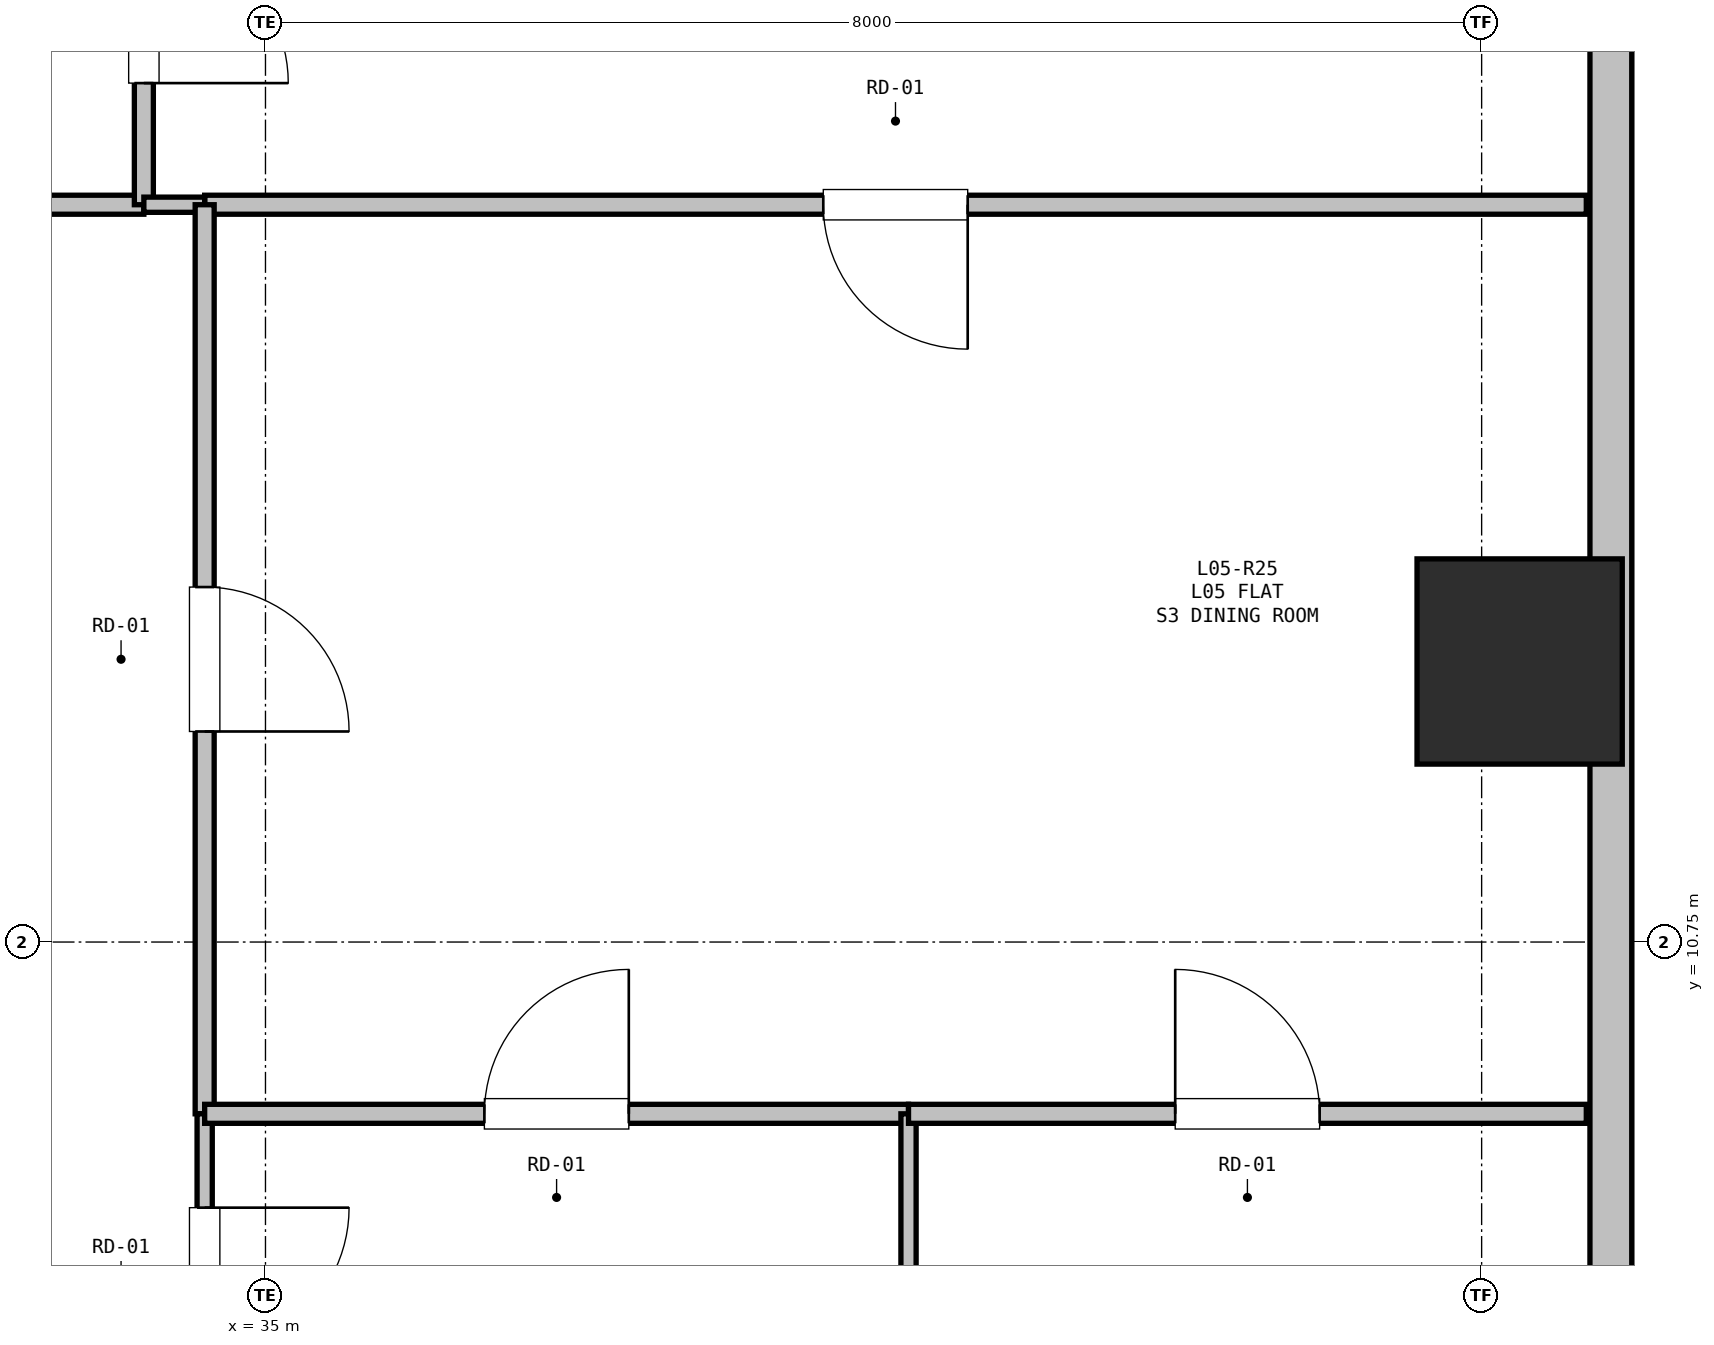
"""IFC4 building model, lengths in metres.
Left out: names, types, materials, properties, quantities, classifications, styles, units other than length and angle.
Written with IfcOpenShell. Run it as: python <this file> out.ifc"""

import sys

from ifc_helpers import new_model, si_unit, direction, frame, frame_2d, origin, origin_2d, place, context, subcontext, project, spatial, rectangle, hollow_rectangle, extrude, element, fill, save


model = new_model("IFC4")
c1 = context("Model", 3, precision=1e-05, world=origin(), true_north=direction((0.0, 1.0)))
c2 = subcontext(c1, "Body", "Model", "MODEL_VIEW")
j1 = project(units=[si_unit("LENGTHUNIT", "METRE"), si_unit("PLANEANGLEUNIT", "RADIAN")], contexts=[c1])
p1 = place(None, origin())
s1 = spatial("IfcSite", under=j1, at=p1, CompositionType="ELEMENT")
p2 = place(p1, origin())
s2 = spatial("IfcBuilding", under=s1, at=p2, CompositionType="ELEMENT")
p3 = place(p2, frame((0.0, 0.0, 22.5)))
s3 = spatial("IfcBuildingStorey", under=s2, at=p3, CompositionType="ELEMENT", Elevation=22.5)
p4 = place(p3, frame((43.25, 12.595, 0.0), z_axis=(0.0, 0.0, 1.0), x_axis=(1.0, 0.0, 0.0)))
e1 = element("IfcColumn", 1, at=p4, inside=s3, PredefinedType="COLUMN", context=c2, shape_type="SweptSolid", body=[
    extrude(hollow_rectangle(XDim=1.35, YDim=1.35, WallThickness=0.036, at=origin_2d()), origin(), (0.0, 0.0, 1.0), 3.3),
])
p5 = place(p3, frame((43.85, 19.063, 0.0), z_axis=(0.0, 0.0, 1.0), x_axis=(0.0, -1.0, 0.0)))
e2 = element("IfcWall", 2, at=p5, inside=s3, PredefinedType="SOLIDWALL", context=c2, shape_type="SweptSolid", body=[
    extrude(rectangle(XDim=12.673, YDim=0.275, at=frame_2d((6.336, 0.0))), origin(), (0.0, 0.0, 1.0), 2.66),
])
p6 = place(p3, frame((39.207, 3.71, 0.0), z_axis=(0.0, 0.0, 1.0), x_axis=(-0.86603192154, 0.499988710747, 0.0)))
e3 = element("IfcWall", 3, at=p6, inside=s3, PredefinedType="SOLIDWALL", context=c2, shape_type="SweptSolid", body=[
    extrude(rectangle(XDim=12.673, YDim=0.275, at=frame_2d((6.336, 0.0))), origin(), (0.0, 0.0, 1.0), 2.66),
])
p7 = place(p6, frame((8.136, 0.0, 0.0)))
e4 = element("IfcOpeningElement", 4, at=p7, cuts=e3, PredefinedType="OPENING", context=c2, shape_type="SweptSolid", body=[
    extrude(rectangle(XDim=1.0, YDim=2.1, at=frame_2d((0.5, 1.05))), frame((0.0, 0.147, 0.0), z_axis=(0.0, -1.0, 0.0), x_axis=(1.0, 0.0, 0.0)), (0.0, 0.0, 1.0), 0.295),
])
p8 = place(p6, frame((2.216, 0.0, 0.9)))
e5 = element("IfcOpeningElement", 5, at=p8, cuts=e3, PredefinedType="OPENING", context=c2, shape_type="SweptSolid", body=[
    extrude(rectangle(XDim=1.2, YDim=1.4, at=frame_2d((0.6, 0.7))), frame((0.0, 0.147, 0.0), z_axis=(0.0, -1.0, 0.0), x_axis=(1.0, 0.0, 0.0)), (0.0, 0.0, 1.0), 0.295),
])
p9 = place(p3, frame((34.2, 15.6, 0.0), z_axis=(0.0, 0.0, 1.0), x_axis=(-1.0, 0.0, 0.0)))
e6 = element("IfcWall", 6, at=p9, inside=s3, PredefinedType="PARTITIONING", context=c2, shape_type="SweptSolid", body=[
    extrude(rectangle(XDim=2.6, YDim=0.125, at=frame_2d((1.3, 0.0))), origin(), (0.0, 0.0, 1.0), 3.04),
])
p10 = place(p9, frame((0.825, 0.0, 0.0)))
e7 = element("IfcOpeningElement", 7, at=p10, cuts=e6, PredefinedType="OPENING", context=c2, shape_type="SweptSolid", body=[
    extrude(rectangle(XDim=0.95, YDim=2.1, at=frame_2d((0.475, 1.05))), frame((0.0, 0.073, 0.0), z_axis=(0.0, -1.0, 0.0), x_axis=(1.0, 0.0, 0.0)), (0.0, 0.0, 1.0), 0.145),
])
p11 = place(p3, frame((34.2, 18.15, 0.0), z_axis=(0.0, 0.0, 1.0), x_axis=(0.0, -1.0, 0.0)))
e8 = element("IfcWall", 8, at=p11, inside=s3, PredefinedType="PARTITIONING", context=c2, shape_type="SweptSolid", body=[
    extrude(rectangle(XDim=2.55, YDim=0.125, at=frame_2d((1.275, 0.0))), origin(), (0.0, 0.0, 1.0), 3.04),
])
p12 = place(p11, frame((0.8, 0.0, 0.0)))
e9 = element("IfcOpeningElement", 9, at=p12, cuts=e8, PredefinedType="OPENING", context=c2, shape_type="SweptSolid", body=[
    extrude(rectangle(XDim=0.95, YDim=2.1, at=frame_2d((0.475, 1.05))), frame((0.0, 0.073, 0.0), z_axis=(0.0, -1.0, 0.0), x_axis=(1.0, 0.0, 0.0)), (0.0, 0.0, 1.0), 0.145),
])
p13 = place(p3, frame((43.688, 15.6, 0.0), z_axis=(0.0, 0.0, 1.0), x_axis=(-1.0, 0.0, 0.0)))
e10 = element("IfcWall", 10, at=p13, inside=s3, PredefinedType="PARTITIONING", context=c2, shape_type="SweptSolid", body=[
    extrude(rectangle(XDim=9.088, YDim=0.125, at=frame_2d((4.544, 0.0))), origin(), (0.0, 0.0, 1.0), 2.337),
])
p14 = place(p13, frame((4.069, 0.0, 0.0)))
e11 = element("IfcOpeningElement", 11, at=p14, cuts=e10, PredefinedType="OPENING", context=c2, shape_type="SweptSolid", body=[
    extrude(rectangle(XDim=0.95, YDim=2.1, at=frame_2d((0.475, 1.05))), frame((0.0, 0.073, 0.0), z_axis=(0.0, -1.0, 0.0), x_axis=(1.0, 0.0, 0.0)), (0.0, 0.0, 1.0), 0.145),
])
p15 = place(p3, frame((34.6, 15.6, 0.0), z_axis=(0.0, 0.0, 1.0), x_axis=(-1.0, 0.0, 0.0)))
e12 = element("IfcWall", 12, at=p15, inside=s3, PredefinedType="PARTITIONING", context=c2, shape_type="SweptSolid", body=[
    extrude(rectangle(XDim=0.4, YDim=0.1, at=frame_2d((0.2, 0.0))), origin(), (0.0, 0.0, 1.0), 3.04),
])
p16 = place(p3, frame((34.6, 15.6, 0.0), z_axis=(0.0, 0.0, 1.0), x_axis=(0.0, -1.0, 0.0)))
e13 = element("IfcWall", 13, at=p16, inside=s3, PredefinedType="PARTITIONING", context=c2, shape_type="SweptSolid", body=[
    extrude(rectangle(XDim=5.98, YDim=0.125, at=frame_2d((2.99, 0.0))), origin(), (0.0, 0.0, 1.0), 3.04),
])
p17 = place(p16, frame((2.515, 0.0, 0.0)))
e14 = element("IfcOpeningElement", 14, at=p17, cuts=e13, PredefinedType="OPENING", context=c2, shape_type="SweptSolid", body=[
    extrude(rectangle(XDim=0.95, YDim=2.1, at=frame_2d((0.475, 1.05))), frame((0.0, 0.073, 0.0), z_axis=(0.0, -1.0, 0.0), x_axis=(1.0, 0.0, 0.0)), (0.0, 0.0, 1.0), 0.145),
])
p18 = place(p3, frame((34.6, 9.62, 0.0), z_axis=(0.0, 0.0, 1.0), x_axis=(0.0, -1.0, 0.0)))
e15 = element("IfcWall", 15, at=p18, inside=s3, PredefinedType="PARTITIONING", context=c2, shape_type="SweptSolid", body=[
    extrude(rectangle(XDim=3.064, YDim=0.1, at=frame_2d((1.532, 0.0))), origin(), (0.0, 0.0, 1.0), 2.65),
])
p19 = place(p18, frame((0.617, 0.0, 0.0)))
e16 = element("IfcOpeningElement", 16, at=p19, cuts=e15, PredefinedType="OPENING", context=c2, shape_type="SweptSolid", body=[
    extrude(rectangle(XDim=0.95, YDim=2.1, at=frame_2d((0.475, 1.05))), frame((0.0, 0.06, 0.0), z_axis=(0.0, -1.0, 0.0), x_axis=(1.0, 0.0, 0.0)), (0.0, 0.0, 1.0), 0.12),
])
p20 = place(p3, frame((34.6, 9.62, 0.0), z_axis=(0.0, 0.0, 1.0), x_axis=(1.0, 0.0, 0.0)))
e17 = element("IfcWall", 17, at=p20, inside=s3, PredefinedType="PARTITIONING", context=c2, shape_type="SweptSolid", body=[
    extrude(rectangle(XDim=4.63, YDim=0.125, at=frame_2d((2.315, 0.0))), origin(), (0.0, 0.0, 1.0), 3.04),
])
p21 = place(p20, frame((1.84, 0.0, 0.0)))
e18 = element("IfcOpeningElement", 18, at=p21, cuts=e17, PredefinedType="OPENING", context=c2, shape_type="SweptSolid", body=[
    extrude(rectangle(XDim=0.95, YDim=2.1, at=frame_2d((0.475, 1.05))), frame((0.0, 0.073, 0.0), z_axis=(0.0, -1.0, 0.0), x_axis=(1.0, 0.0, 0.0)), (0.0, 0.0, 1.0), 0.145),
])
p22 = place(p3, frame((39.23, 9.62, 0.0), z_axis=(0.0, 0.0, 1.0), x_axis=(0.0, -1.0, 0.0)))
e19 = element("IfcWall", 19, at=p22, inside=s3, PredefinedType="PARTITIONING", context=c2, shape_type="SweptSolid", body=[
    extrude(rectangle(XDim=5.924, YDim=0.1, at=frame_2d((2.962, 0.0))), origin(), (0.0, 0.0, 1.0), 3.04),
])
p23 = place(p22, frame((2.487, 0.0, 0.0)))
e20 = element("IfcOpeningElement", 20, at=p23, cuts=e19, PredefinedType="OPENING", context=c2, shape_type="SweptSolid", body=[
    extrude(rectangle(XDim=0.95, YDim=2.1, at=frame_2d((0.475, 1.05))), frame((0.0, 0.06, 0.0), z_axis=(0.0, -1.0, 0.0), x_axis=(1.0, 0.0, 0.0)), (0.0, 0.0, 1.0), 0.12),
])
p24 = place(p3, frame((39.23, 9.62, 0.0), z_axis=(0.0, 0.0, 1.0), x_axis=(1.0, 0.0, 0.0)))
e21 = element("IfcWall", 21, at=p24, inside=s3, PredefinedType="PARTITIONING", context=c2, shape_type="SweptSolid", body=[
    extrude(rectangle(XDim=4.458, YDim=0.125, at=frame_2d((2.229, 0.0))), origin(), (0.0, 0.0, 1.0), 2.337),
])
p25 = place(p24, frame((1.754, 0.0, 0.0)))
e22 = element("IfcOpeningElement", 22, at=p25, cuts=e21, PredefinedType="OPENING", context=c2, shape_type="SweptSolid", body=[
    extrude(rectangle(XDim=0.95, YDim=2.1, at=frame_2d((0.475, 1.05))), frame((0.0, 0.073, 0.0), z_axis=(0.0, -1.0, 0.0), x_axis=(1.0, 0.0, 0.0)), (0.0, 0.0, 1.0), 0.145),
])
p26 = place(p12, origin())
e23 = element("IfcDoor", 23, at=p26, inside=s3, OperationType="SINGLE_SWING_RIGHT", PredefinedType="DOOR", context=c2, shape_type="SweptSolid", body=[
    extrude(rectangle(XDim=0.95, YDim=2.1, at=frame_2d((0.475, 1.05))), frame((0.0, 0.025, 0.0), z_axis=(0.0, -1.0, 0.0), x_axis=(1.0, 0.0, 0.0)), (0.0, 0.0, 1.0), 0.05),
])
fill(e9, e23)
p27 = place(p14, origin())
e24 = element("IfcDoor", 24, at=p27, inside=s3, OperationType="SINGLE_SWING_LEFT", PredefinedType="DOOR", context=c2, shape_type="SweptSolid", body=[
    extrude(rectangle(XDim=0.95, YDim=2.1, at=frame_2d((0.475, 1.05))), frame((0.0, 0.025, 0.0), z_axis=(0.0, -1.0, 0.0), x_axis=(1.0, 0.0, 0.0)), (0.0, 0.0, 1.0), 0.05),
])
fill(e11, e24)
p28 = place(p19, origin())
e25 = element("IfcDoor", 25, at=p28, inside=s3, OperationType="SINGLE_SWING_LEFT", PredefinedType="DOOR", context=c2, shape_type="SweptSolid", body=[
    extrude(rectangle(XDim=0.95, YDim=2.1, at=frame_2d((0.475, 1.05))), frame((0.0, 0.025, 0.0), z_axis=(0.0, -1.0, 0.0), x_axis=(1.0, 0.0, 0.0)), (0.0, 0.0, 1.0), 0.05),
])
fill(e16, e25)
p29 = place(p17, origin())
e26 = element("IfcDoor", 26, at=p29, inside=s3, OperationType="SINGLE_SWING_RIGHT", PredefinedType="DOOR", context=c2, shape_type="SweptSolid", body=[
    extrude(rectangle(XDim=0.95, YDim=2.1, at=frame_2d((0.475, 1.05))), frame((0.0, 0.025, 0.0), z_axis=(0.0, -1.0, 0.0), x_axis=(1.0, 0.0, 0.0)), (0.0, 0.0, 1.0), 0.05),
])
fill(e14, e26)
p30 = place(p21, origin())
e27 = element("IfcDoor", 27, at=p30, inside=s3, OperationType="SINGLE_SWING_RIGHT", PredefinedType="DOOR", context=c2, shape_type="SweptSolid", body=[
    extrude(rectangle(XDim=0.95, YDim=2.1, at=frame_2d((0.475, 1.05))), frame((0.0, 0.025, 0.0), z_axis=(0.0, -1.0, 0.0), x_axis=(1.0, 0.0, 0.0)), (0.0, 0.0, 1.0), 0.05),
])
fill(e18, e27)
p31 = place(p25, origin())
e28 = element("IfcDoor", 28, at=p31, inside=s3, OperationType="SINGLE_SWING_LEFT", PredefinedType="DOOR", context=c2, shape_type="SweptSolid", body=[
    extrude(rectangle(XDim=0.95, YDim=2.1, at=frame_2d((0.475, 1.05))), frame((0.0, 0.025, 0.0), z_axis=(0.0, -1.0, 0.0), x_axis=(1.0, 0.0, 0.0)), (0.0, 0.0, 1.0), 0.05),
])
fill(e22, e28)
save(model, sys.argv[1])
